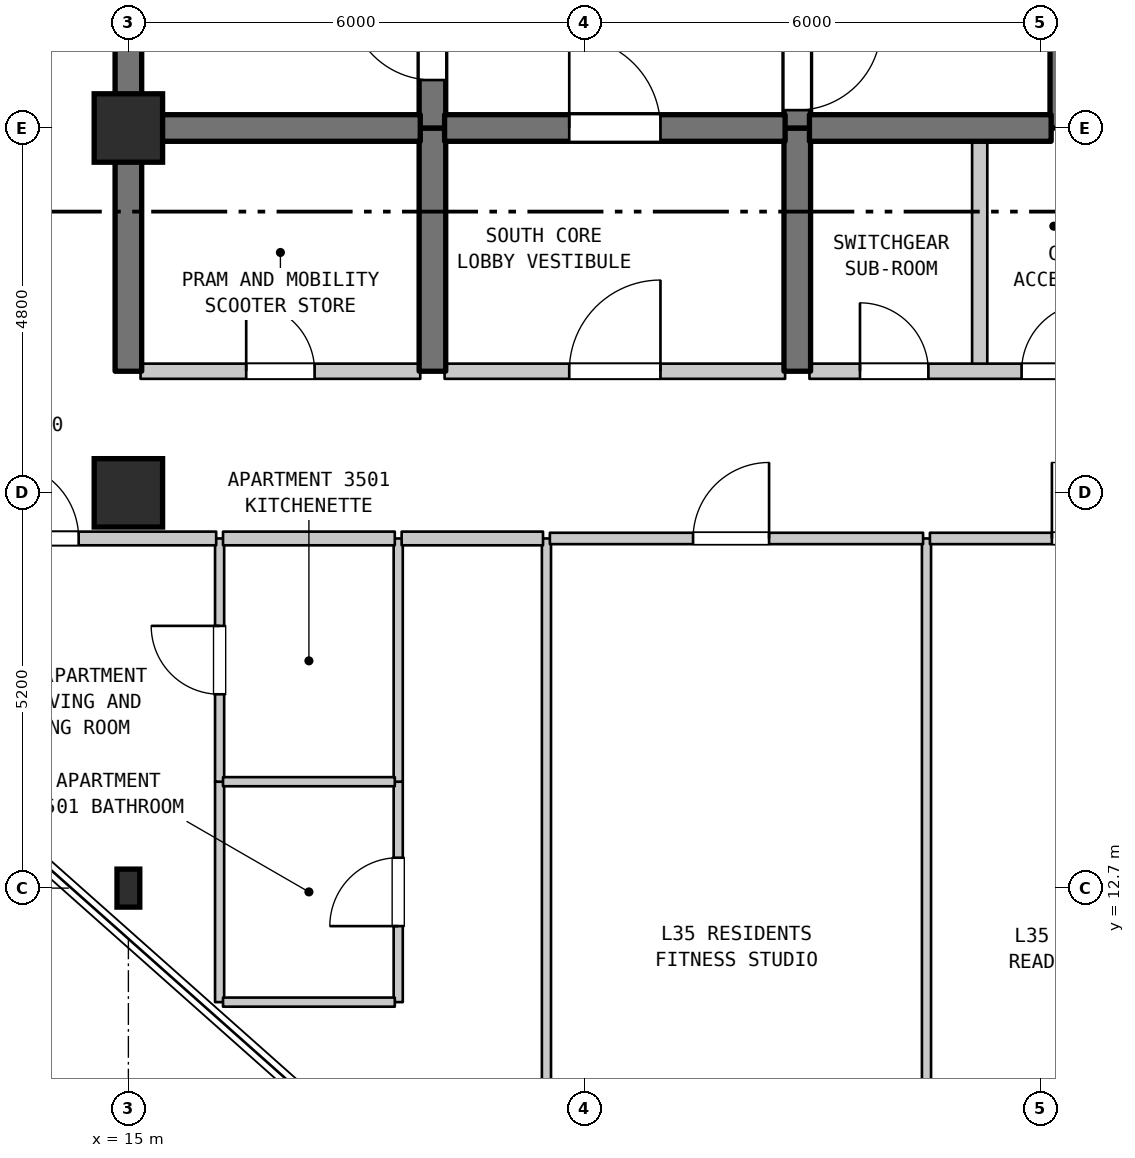
"""IFC4 building model, lengths in metres.
Left out: names, types, materials, properties, quantities, classifications, styles, units other than length and angle.
Written with IfcOpenShell. Run it as: python <this file> out.ifc"""

import sys

from ifc_helpers import new_model, si_unit, direction, frame, frame_2d, origin, origin_2d, place, context, subcontext, project, spatial, rectangle, i_section, extrude, element, fill, save


model = new_model("IFC4")
c1 = context("Model", 3, precision=1e-05, world=origin(), true_north=direction((0.0, 1.0)))
c2 = subcontext(c1, "Body", "Model", "MODEL_VIEW")
j1 = project(units=[si_unit("LENGTHUNIT", "METRE"), si_unit("PLANEANGLEUNIT", "RADIAN")], contexts=[c1])
p1 = place(None, origin())
s1 = spatial("IfcSite", under=j1, at=p1, CompositionType="ELEMENT")
p2 = place(p1, origin())
s2 = spatial("IfcBuilding", under=s1, at=p2, CompositionType="ELEMENT")
p3 = place(p2, frame((0.0, 0.0, 144.6)))
s3 = spatial("IfcBuildingStorey", under=s2, at=p3, CompositionType="ELEMENT", Elevation=144.6)
p4 = place(p3, frame((15.0, 12.7, 0.0), z_axis=(0.0, 0.0, 1.0), x_axis=(1.0, 0.0, 0.0)))
e1 = element("IfcColumn", 1, at=p4, inside=s3, PredefinedType="COLUMN", context=c2, shape_type="SweptSolid", body=[
    extrude(i_section(OverallWidth=0.3, OverallDepth=0.5, WebThickness=0.014, FlangeThickness=0.028, FilletRadius=0.027, at=origin_2d()), origin(), (0.0, 0.0, 1.0), 3.7),
])
for number, where, z_axis, x_axis in (
    (2, (15.0, 17.9, 0.0), (0.0, 0.0, 1.0), (1.0, 0.0, 0.0)),
    (3, (15.0, 22.7, 0.0), (0.0, 0.0, 1.0), (1.0, 0.0, 0.0)),
):
    element("IfcColumn", number, at=place(p3, frame(where, z_axis=z_axis, x_axis=x_axis)), inside=s3, PredefinedType="COLUMN", context=c2, shape_type="SweptSolid", body=[
        extrude(rectangle(XDim=0.9, YDim=0.9, at=origin_2d()), origin(), (0.0, 0.0, 1.0), 3.7),
    ])
p5 = place(p3, frame((15.0, 19.5, 0.0), z_axis=(0.0, 0.0, 1.0), x_axis=(0.0, 1.0, 0.0)))
e4 = element("IfcWall", 4, at=p5, inside=s3, PredefinedType="SHEAR", context=c2, shape_type="SweptSolid", body=[
    extrude(rectangle(XDim=3.2, YDim=0.35, at=frame_2d((1.6, 0.0))), origin(), (0.0, 0.0, 1.0), 3.385),
])
p6 = place(p3, frame((15.0, 22.7, 0.0), z_axis=(0.0, 0.0, 1.0), x_axis=(0.0, 1.0, 0.0)))
e5 = element("IfcWall", 5, at=p6, inside=s3, PredefinedType="SHEAR", context=c2, shape_type="SweptSolid", body=[
    extrude(rectangle(XDim=6.8, YDim=0.35, at=frame_2d((3.4, 0.0))), origin(), (0.0, 0.0, 1.0), 3.385),
])
p7 = place(p3, frame((16.2, 11.2, 0.0), z_axis=(0.0, 0.0, 1.0), x_axis=(0.0, 1.0, 0.0)))
e6 = element("IfcWall", 6, at=p7, inside=s3, PredefinedType="PARTITIONING", context=c2, shape_type="SweptSolid", body=[
    extrude(rectangle(XDim=2.9, YDim=0.12, at=frame_2d((1.45, 0.0))), origin(), (0.0, 0.0, 1.0), 3.385),
])
p8 = place(p3, frame((16.2, 14.1, 0.0), z_axis=(0.0, 0.0, 1.0), x_axis=(0.0, 1.0, 0.0)))
e7 = element("IfcWall", 7, at=p8, inside=s3, PredefinedType="PARTITIONING", context=c2, shape_type="SweptSolid", body=[
    extrude(rectangle(XDim=3.2, YDim=0.12, at=frame_2d((1.6, 0.0))), origin(), (0.0, 0.0, 1.0), 3.385),
])
p9 = place(p8, frame((1.15, 0.0, 0.0)))
e8 = element("IfcOpeningElement", 8, at=p9, cuts=e7, PredefinedType="OPENING", context=c2, shape_type="SweptSolid", body=[
    extrude(rectangle(XDim=0.9, YDim=2.15, at=frame_2d((0.45, 1.075))), frame((0.0, 0.07, 0.0), z_axis=(0.0, -1.0, 0.0), x_axis=(1.0, 0.0, 0.0)), (0.0, 0.0, 1.0), 0.14),
])
p10 = place(p3, frame((18.55, 11.2, 0.0), z_axis=(0.0, 0.0, 1.0), x_axis=(0.0, 1.0, 0.0)))
e9 = element("IfcWall", 9, at=p10, inside=s3, PredefinedType="PARTITIONING", context=c2, shape_type="SweptSolid", body=[
    extrude(rectangle(XDim=2.9, YDim=0.12, at=frame_2d((1.45, 0.0))), origin(), (0.0, 0.0, 1.0), 3.385),
])
p11 = place(p10, frame((1.0, 0.0, 0.0)))
e10 = element("IfcOpeningElement", 10, at=p11, cuts=e9, PredefinedType="OPENING", context=c2, shape_type="SweptSolid", body=[
    extrude(rectangle(XDim=0.9, YDim=2.1, at=frame_2d((0.45, 1.05))), frame((0.0, 0.07, 0.0), z_axis=(0.0, -1.0, 0.0), x_axis=(1.0, 0.0, 0.0)), (0.0, 0.0, 1.0), 0.14),
])
p12 = place(p3, frame((18.55, 14.1, 0.0), z_axis=(0.0, 0.0, 1.0), x_axis=(0.0, 1.0, 0.0)))
e11 = element("IfcWall", 11, at=p12, inside=s3, PredefinedType="PARTITIONING", context=c2, shape_type="SweptSolid", body=[
    extrude(rectangle(XDim=3.2, YDim=0.12, at=frame_2d((1.6, 0.0))), origin(), (0.0, 0.0, 1.0), 3.385),
])
p13 = place(p3, frame((19.0, 19.5, 0.0), z_axis=(0.0, 0.0, 1.0), x_axis=(0.0, 1.0, 0.0)))
e12 = element("IfcWall", 12, at=p13, inside=s3, PredefinedType="SHEAR", context=c2, shape_type="SweptSolid", body=[
    extrude(rectangle(XDim=3.2, YDim=0.35, at=frame_2d((1.6, 0.0))), origin(), (0.0, 0.0, 1.0), 3.385),
])
p14 = place(p3, frame((19.0, 22.7, 0.0), z_axis=(0.0, 0.0, 1.0), x_axis=(0.0, 1.0, 0.0)))
e13 = element("IfcWall", 13, at=p14, inside=s3, PredefinedType="SHEAR", context=c2, shape_type="SweptSolid", body=[
    extrude(rectangle(XDim=5.5, YDim=0.35, at=frame_2d((2.75, 0.0))), origin(), (0.0, 0.0, 1.0), 3.385),
])
p15 = place(p14, frame((0.631, 0.0, 0.0)))
e14 = element("IfcOpeningElement", 14, at=p15, cuts=e13, PredefinedType="OPENING", context=c2, shape_type="SweptSolid", body=[
    extrude(rectangle(XDim=1.1, YDim=2.15, at=frame_2d((0.55, 1.075))), frame((0.0, 0.185, 0.0), z_axis=(0.0, -1.0, 0.0), x_axis=(1.0, 0.0, 0.0)), (0.0, 0.0, 1.0), 0.37),
])
p16 = place(p3, frame((20.5, 7.154, 0.0), z_axis=(0.0, 0.0, 1.0), x_axis=(0.0, 1.0, 0.0)))
e15 = element("IfcWall", 15, at=p16, inside=s3, PredefinedType="PARTITIONING", context=c2, shape_type="SweptSolid", body=[
    extrude(rectangle(XDim=10.146, YDim=0.12, at=frame_2d((5.073, 0.0))), origin(), (0.0, 0.0, 1.0), 3.385),
])
p17 = place(p3, frame((23.8, 19.5, 0.0), z_axis=(0.0, 0.0, 1.0), x_axis=(0.0, 1.0, 0.0)))
e16 = element("IfcWall", 16, at=p17, inside=s3, PredefinedType="SHEAR", context=c2, shape_type="SweptSolid", body=[
    extrude(rectangle(XDim=3.2, YDim=0.35, at=frame_2d((1.6, 0.0))), origin(), (0.0, 0.0, 1.0), 3.385),
])
p18 = place(p3, frame((23.8, 22.7, 0.0), z_axis=(0.0, 0.0, 1.0), x_axis=(0.0, 1.0, 0.0)))
e17 = element("IfcWall", 17, at=p18, inside=s3, PredefinedType="SHEAR", context=c2, shape_type="SweptSolid", body=[
    extrude(rectangle(XDim=5.5, YDim=0.35, at=frame_2d((2.75, 0.0))), origin(), (0.0, 0.0, 1.0), 3.385),
])
p19 = place(p18, frame((0.235, 0.0, 0.0)))
e18 = element("IfcOpeningElement", 18, at=p19, cuts=e17, PredefinedType="OPENING", context=c2, shape_type="SweptSolid", body=[
    extrude(rectangle(XDim=1.1, YDim=2.15, at=frame_2d((0.55, 1.075))), frame((0.0, 0.185, 0.0), z_axis=(0.0, -1.0, 0.0), x_axis=(1.0, 0.0, 0.0)), (0.0, 0.0, 1.0), 0.37),
])
p20 = place(p3, frame((25.5, 0.71, 0.0), z_axis=(0.0, 0.0, 1.0), x_axis=(0.0, 1.0, 0.0)))
e19 = element("IfcWall", 19, at=p20, inside=s3, PredefinedType="PARTITIONING", context=c2, shape_type="SweptSolid", body=[
    extrude(rectangle(XDim=16.59, YDim=0.12, at=frame_2d((8.295, 0.0))), origin(), (0.0, 0.0, 1.0), 3.385),
])
p21 = place(p3, frame((26.2, 19.5, 0.0), z_axis=(0.0, 0.0, 1.0), x_axis=(0.0, 1.0, 0.0)))
e20 = element("IfcWall", 20, at=p21, inside=s3, PredefinedType="STANDARD", context=c2, shape_type="SweptSolid", body=[
    extrude(rectangle(XDim=3.2, YDim=0.2, at=frame_2d((1.6, 0.0))), origin(), (0.0, 0.0, 1.0), 3.385),
])
p22 = place(p3, frame((27.3, 22.7, 0.0), z_axis=(0.0, 0.0, 1.0), x_axis=(0.0, 1.0, 0.0)))
e21 = element("IfcWall", 21, at=p22, inside=s3, PredefinedType="SHEAR", context=c2, shape_type="SweptSolid", body=[
    extrude(rectangle(XDim=2.9, YDim=0.35, at=frame_2d((1.45, 0.0))), origin(), (0.0, 0.0, 1.0), 3.385),
])
for number, where, z_axis, x_axis in (
    (22, (16.245, 11.2, 0.0), (0.0, 0.0, 1.0), (1.0, 0.0, 0.0)),
    (23, (16.245, 14.1, 0.0), (0.0, 0.0, 1.0), (1.0, 0.0, 0.0)),
):
    element("IfcWall", number, at=place(p3, frame(where, z_axis=z_axis, x_axis=x_axis)), inside=s3, PredefinedType="PARTITIONING", context=c2, shape_type="SweptSolid", body=[
        extrude(rectangle(XDim=2.26, YDim=0.12, at=frame_2d((1.13, 0.0))), origin(), (0.0, 0.0, 1.0), 3.385),
    ])
p23 = place(p3, frame((12.875, 17.3, 0.0), z_axis=(0.0, 0.0, 1.0), x_axis=(1.0, 0.0, 0.0)))
e24 = element("IfcWall", 24, at=p23, inside=s3, PredefinedType="STANDARD", context=c2, shape_type="SweptSolid", body=[
    extrude(rectangle(XDim=3.28, YDim=0.18, at=frame_2d((1.64, 0.0))), origin(), (0.0, 0.0, 1.0), 3.385),
])
p24 = place(p23, frame((0.471, 0.0, 0.0)))
e25 = element("IfcOpeningElement", 25, at=p24, cuts=e24, PredefinedType="OPENING", context=c2, shape_type="SweptSolid", body=[
    extrude(rectangle(XDim=1.0, YDim=2.15, at=frame_2d((0.5, 1.075))), frame((0.0, 0.1, 0.0), z_axis=(0.0, -1.0, 0.0), x_axis=(1.0, 0.0, 0.0)), (0.0, 0.0, 1.0), 0.2),
])
p25 = place(p3, frame((16.245, 17.3, 0.0), z_axis=(0.0, 0.0, 1.0), x_axis=(1.0, 0.0, 0.0)))
e26 = element("IfcWall", 26, at=p25, inside=s3, PredefinedType="STANDARD", context=c2, shape_type="SweptSolid", body=[
    extrude(rectangle(XDim=2.26, YDim=0.18, at=frame_2d((1.13, 0.0))), origin(), (0.0, 0.0, 1.0), 3.385),
])
p26 = place(p3, frame((18.595, 17.3, 0.0), z_axis=(0.0, 0.0, 1.0), x_axis=(1.0, 0.0, 0.0)))
e27 = element("IfcWall", 27, at=p26, inside=s3, PredefinedType="STANDARD", context=c2, shape_type="SweptSolid", body=[
    extrude(rectangle(XDim=1.86, YDim=0.18, at=frame_2d((0.93, 0.0))), origin(), (0.0, 0.0, 1.0), 3.385),
])
p27 = place(p3, frame((20.545, 17.3, 0.0), z_axis=(0.0, 0.0, 1.0), x_axis=(1.0, 0.0, 0.0)))
e28 = element("IfcWall", 28, at=p27, inside=s3, PredefinedType="STANDARD", context=c2, shape_type="SweptSolid", body=[
    extrude(rectangle(XDim=4.91, YDim=0.15, at=frame_2d((2.455, 0.0))), origin(), (0.0, 0.0, 1.0), 3.385),
])
p28 = place(p27, frame((1.884, 0.0, 0.0)))
e29 = element("IfcOpeningElement", 29, at=p28, cuts=e28, PredefinedType="OPENING", context=c2, shape_type="SweptSolid", body=[
    extrude(rectangle(XDim=1.0, YDim=2.15, at=frame_2d((0.5, 1.075))), frame((0.0, 0.085, 0.0), z_axis=(0.0, -1.0, 0.0), x_axis=(1.0, 0.0, 0.0)), (0.0, 0.0, 1.0), 0.17),
])
p29 = place(p3, frame((25.545, 17.3, 0.0), z_axis=(0.0, 0.0, 1.0), x_axis=(1.0, 0.0, 0.0)))
e30 = element("IfcWall", 30, at=p29, inside=s3, PredefinedType="STANDARD", context=c2, shape_type="SweptSolid", body=[
    extrude(rectangle(XDim=4.21, YDim=0.15, at=frame_2d((2.105, 0.0))), origin(), (0.0, 0.0, 1.0), 3.385),
])
p30 = place(p29, frame((1.605, 0.0, 0.0)))
e31 = element("IfcOpeningElement", 31, at=p30, cuts=e30, PredefinedType="OPENING", context=c2, shape_type="SweptSolid", body=[
    extrude(rectangle(XDim=1.0, YDim=2.15, at=frame_2d((0.5, 1.075))), frame((0.0, 0.085, 0.0), z_axis=(0.0, -1.0, 0.0), x_axis=(1.0, 0.0, 0.0)), (0.0, 0.0, 1.0), 0.17),
])
p31 = place(p3, frame((15.16, 19.5, 0.0), z_axis=(0.0, 0.0, 1.0), x_axis=(1.0, 0.0, 0.0)))
e32 = element("IfcWall", 32, at=p31, inside=s3, PredefinedType="STANDARD", context=c2, shape_type="SweptSolid", body=[
    extrude(rectangle(XDim=3.68, YDim=0.2, at=frame_2d((1.84, 0.0))), origin(), (0.0, 0.0, 1.0), 3.385),
])
p32 = place(p31, frame((1.39, 0.0, 0.0)))
e33 = element("IfcOpeningElement", 33, at=p32, cuts=e32, PredefinedType="OPENING", context=c2, shape_type="SweptSolid", body=[
    extrude(rectangle(XDim=0.9, YDim=2.15, at=frame_2d((0.45, 1.075))), frame((0.0, 0.11, 0.0), z_axis=(0.0, -1.0, 0.0), x_axis=(1.0, 0.0, 0.0)), (0.0, 0.0, 1.0), 0.22),
])
p33 = place(p3, frame((19.16, 19.5, 0.0), z_axis=(0.0, 0.0, 1.0), x_axis=(1.0, 0.0, 0.0)))
e34 = element("IfcWall", 34, at=p33, inside=s3, PredefinedType="STANDARD", context=c2, shape_type="SweptSolid", body=[
    extrude(rectangle(XDim=4.48, YDim=0.2, at=frame_2d((2.24, 0.0))), origin(), (0.0, 0.0, 1.0), 3.385),
])
p34 = place(p33, frame((1.64, 0.0, 0.0)))
e35 = element("IfcOpeningElement", 35, at=p34, cuts=e34, PredefinedType="OPENING", context=c2, shape_type="SweptSolid", body=[
    extrude(rectangle(XDim=1.2, YDim=2.2, at=frame_2d((0.6, 1.1))), frame((0.0, 0.11, 0.0), z_axis=(0.0, -1.0, 0.0), x_axis=(1.0, 0.0, 0.0)), (0.0, 0.0, 1.0), 0.22),
])
p35 = place(p3, frame((23.96, 19.5, 0.0), z_axis=(0.0, 0.0, 1.0), x_axis=(1.0, 0.0, 0.0)))
e36 = element("IfcWall", 36, at=p35, inside=s3, PredefinedType="STANDARD", context=c2, shape_type="SweptSolid", body=[
    extrude(rectangle(XDim=4.455, YDim=0.2, at=frame_2d((2.228, 0.0))), origin(), (0.0, 0.0, 1.0), 3.385),
])
p36 = place(p35, frame((0.665, 0.0, 0.0)))
e37 = element("IfcOpeningElement", 37, at=p36, cuts=e36, PredefinedType="OPENING", context=c2, shape_type="SweptSolid", body=[
    extrude(rectangle(XDim=0.9, YDim=2.15, at=frame_2d((0.45, 1.075))), frame((0.0, 0.11, 0.0), z_axis=(0.0, -1.0, 0.0), x_axis=(1.0, 0.0, 0.0)), (0.0, 0.0, 1.0), 0.22),
])
p37 = place(p35, frame((2.791, 0.0, 0.0)))
e38 = element("IfcOpeningElement", 38, at=p37, cuts=e36, PredefinedType="OPENING", context=c2, shape_type="SweptSolid", body=[
    extrude(rectangle(XDim=0.9, YDim=2.15, at=frame_2d((0.45, 1.075))), frame((0.0, 0.11, 0.0), z_axis=(0.0, -1.0, 0.0), x_axis=(1.0, 0.0, 0.0)), (0.0, 0.0, 1.0), 0.22),
])
p38 = place(p3, frame((15.16, 22.7, 0.0), z_axis=(0.0, 0.0, 1.0), x_axis=(1.0, 0.0, 0.0)))
e39 = element("IfcWall", 39, at=p38, inside=s3, PredefinedType="SHEAR", context=c2, shape_type="SweptSolid", body=[
    extrude(rectangle(XDim=3.68, YDim=0.35, at=frame_2d((1.84, 0.0))), origin(), (0.0, 0.0, 1.0), 3.385),
])
p39 = place(p3, frame((19.16, 22.7, 0.0), z_axis=(0.0, 0.0, 1.0), x_axis=(1.0, 0.0, 0.0)))
e40 = element("IfcWall", 40, at=p39, inside=s3, PredefinedType="SHEAR", context=c2, shape_type="SweptSolid", body=[
    extrude(rectangle(XDim=4.48, YDim=0.35, at=frame_2d((2.24, 0.0))), origin(), (0.0, 0.0, 1.0), 3.385),
])
p40 = place(p39, frame((1.64, 0.0, 0.0)))
e41 = element("IfcOpeningElement", 41, at=p40, cuts=e40, PredefinedType="OPENING", context=c2, shape_type="SweptSolid", body=[
    extrude(rectangle(XDim=1.2, YDim=2.2, at=frame_2d((0.6, 1.1))), frame((0.0, 0.185, 0.0), z_axis=(0.0, -1.0, 0.0), x_axis=(1.0, 0.0, 0.0)), (0.0, 0.0, 1.0), 0.37),
])
p41 = place(p3, frame((23.96, 22.7, 0.0), z_axis=(0.0, 0.0, 1.0), x_axis=(1.0, 0.0, 0.0)))
e42 = element("IfcWall", 42, at=p41, inside=s3, PredefinedType="SHEAR", context=c2, shape_type="SweptSolid", body=[
    extrude(rectangle(XDim=3.18, YDim=0.35, at=frame_2d((1.59, 0.0))), origin(), (0.0, 0.0, 1.0), 3.385),
])
p42 = place(p9, origin())
e43 = element("IfcDoor", 43, at=p42, inside=s3, OperationType="SINGLE_SWING_RIGHT", PredefinedType="DOOR", context=c2, shape_type="SweptSolid", body=[
    extrude(rectangle(XDim=0.9, YDim=2.15, at=frame_2d((0.45, 1.075))), frame((0.0, 0.025, 0.0), z_axis=(0.0, -1.0, 0.0), x_axis=(1.0, 0.0, 0.0)), (0.0, 0.0, 1.0), 0.05),
])
fill(e8, e43)
p43 = place(p11, origin())
e44 = element("IfcDoor", 44, at=p43, inside=s3, OperationType="SINGLE_SWING_LEFT", PredefinedType="DOOR", context=c2, shape_type="SweptSolid", body=[
    extrude(rectangle(XDim=0.9, YDim=2.1, at=frame_2d((0.45, 1.05))), frame((0.0, 0.025, 0.0), z_axis=(0.0, -1.0, 0.0), x_axis=(1.0, 0.0, 0.0)), (0.0, 0.0, 1.0), 0.05),
])
fill(e10, e44)
p44 = place(p15, origin())
e45 = element("IfcDoor", 45, at=p44, inside=s3, OperationType="SINGLE_SWING_RIGHT", PredefinedType="DOOR", context=c2, shape_type="SweptSolid", body=[
    extrude(rectangle(XDim=1.1, YDim=2.15, at=frame_2d((0.55, 1.075))), frame((0.0, 0.025, 0.0), z_axis=(0.0, -1.0, 0.0), x_axis=(1.0, 0.0, 0.0)), (0.0, 0.0, 1.0), 0.05),
])
fill(e14, e45)
p45 = place(p19, frame((1.1, 0.0, 0.0), z_axis=(0.0, 0.0, 1.0), x_axis=(-1.0, 0.0, 0.0)))
e46 = element("IfcDoor", 46, at=p45, inside=s3, OperationType="SINGLE_SWING_RIGHT", PredefinedType="DOOR", context=c2, shape_type="SweptSolid", body=[
    extrude(rectangle(XDim=1.1, YDim=2.15, at=frame_2d((0.55, 1.075))), frame((0.0, 0.025, 0.0), z_axis=(0.0, -1.0, 0.0), x_axis=(1.0, 0.0, 0.0)), (0.0, 0.0, 1.0), 0.05),
])
fill(e18, e46)
p46 = place(p24, origin())
e47 = element("IfcDoor", 47, at=p46, inside=s3, OperationType="SINGLE_SWING_LEFT", PredefinedType="DOOR", context=c2, shape_type="SweptSolid", body=[
    extrude(rectangle(XDim=1.0, YDim=2.15, at=frame_2d((0.5, 1.075))), frame((0.0, 0.025, 0.0), z_axis=(0.0, -1.0, 0.0), x_axis=(1.0, 0.0, 0.0)), (0.0, 0.0, 1.0), 0.05),
])
fill(e25, e47)
p47 = place(p28, origin())
e48 = element("IfcDoor", 48, at=p47, inside=s3, OperationType="SINGLE_SWING_RIGHT", PredefinedType="DOOR", context=c2, shape_type="SweptSolid", body=[
    extrude(rectangle(XDim=1.0, YDim=2.15, at=frame_2d((0.5, 1.075))), frame((0.0, 0.025, 0.0), z_axis=(0.0, -1.0, 0.0), x_axis=(1.0, 0.0, 0.0)), (0.0, 0.0, 1.0), 0.05),
])
fill(e29, e48)
p48 = place(p30, origin())
e49 = element("IfcDoor", 49, at=p48, inside=s3, OperationType="SINGLE_SWING_LEFT", PredefinedType="DOOR", context=c2, shape_type="SweptSolid", body=[
    extrude(rectangle(XDim=1.0, YDim=2.15, at=frame_2d((0.5, 1.075))), frame((0.0, 0.025, 0.0), z_axis=(0.0, -1.0, 0.0), x_axis=(1.0, 0.0, 0.0)), (0.0, 0.0, 1.0), 0.05),
])
fill(e31, e49)
p49 = place(p32, origin())
e50 = element("IfcDoor", 50, at=p49, inside=s3, OperationType="SINGLE_SWING_LEFT", PredefinedType="DOOR", context=c2, shape_type="SweptSolid", body=[
    extrude(rectangle(XDim=0.9, YDim=2.15, at=frame_2d((0.45, 1.075))), frame((0.0, 0.025, 0.0), z_axis=(0.0, -1.0, 0.0), x_axis=(1.0, 0.0, 0.0)), (0.0, 0.0, 1.0), 0.05),
])
fill(e33, e50)
p50 = place(p34, origin())
e51 = element("IfcDoor", 51, at=p50, inside=s3, OperationType="SINGLE_SWING_RIGHT", PredefinedType="DOOR", context=c2, shape_type="SweptSolid", body=[
    extrude(rectangle(XDim=1.2, YDim=2.2, at=frame_2d((0.6, 1.1))), frame((0.0, 0.025, 0.0), z_axis=(0.0, -1.0, 0.0), x_axis=(1.0, 0.0, 0.0)), (0.0, 0.0, 1.0), 0.05),
])
fill(e35, e51)
p51 = place(p36, origin())
e52 = element("IfcDoor", 52, at=p51, inside=s3, OperationType="SINGLE_SWING_LEFT", PredefinedType="DOOR", context=c2, shape_type="SweptSolid", body=[
    extrude(rectangle(XDim=0.9, YDim=2.15, at=frame_2d((0.45, 1.075))), frame((0.0, 0.025, 0.0), z_axis=(0.0, -1.0, 0.0), x_axis=(1.0, 0.0, 0.0)), (0.0, 0.0, 1.0), 0.05),
])
fill(e37, e52)
p52 = place(p37, origin())
e53 = element("IfcDoor", 53, at=p52, inside=s3, OperationType="SINGLE_SWING_RIGHT", PredefinedType="DOOR", context=c2, shape_type="SweptSolid", body=[
    extrude(rectangle(XDim=0.9, YDim=2.15, at=frame_2d((0.45, 1.075))), frame((0.0, 0.025, 0.0), z_axis=(0.0, -1.0, 0.0), x_axis=(1.0, 0.0, 0.0)), (0.0, 0.0, 1.0), 0.05),
])
fill(e38, e53)
p53 = place(p40, origin())
e54 = element("IfcDoor", 54, at=p53, inside=s3, OperationType="SINGLE_SWING_LEFT", PredefinedType="DOOR", context=c2, shape_type="SweptSolid", body=[
    extrude(rectangle(XDim=1.2, YDim=2.2, at=frame_2d((0.6, 1.1))), frame((0.0, 0.025, 0.0), z_axis=(0.0, -1.0, 0.0), x_axis=(1.0, 0.0, 0.0)), (0.0, 0.0, 1.0), 0.05),
])
fill(e41, e54)
save(model, sys.argv[1])
